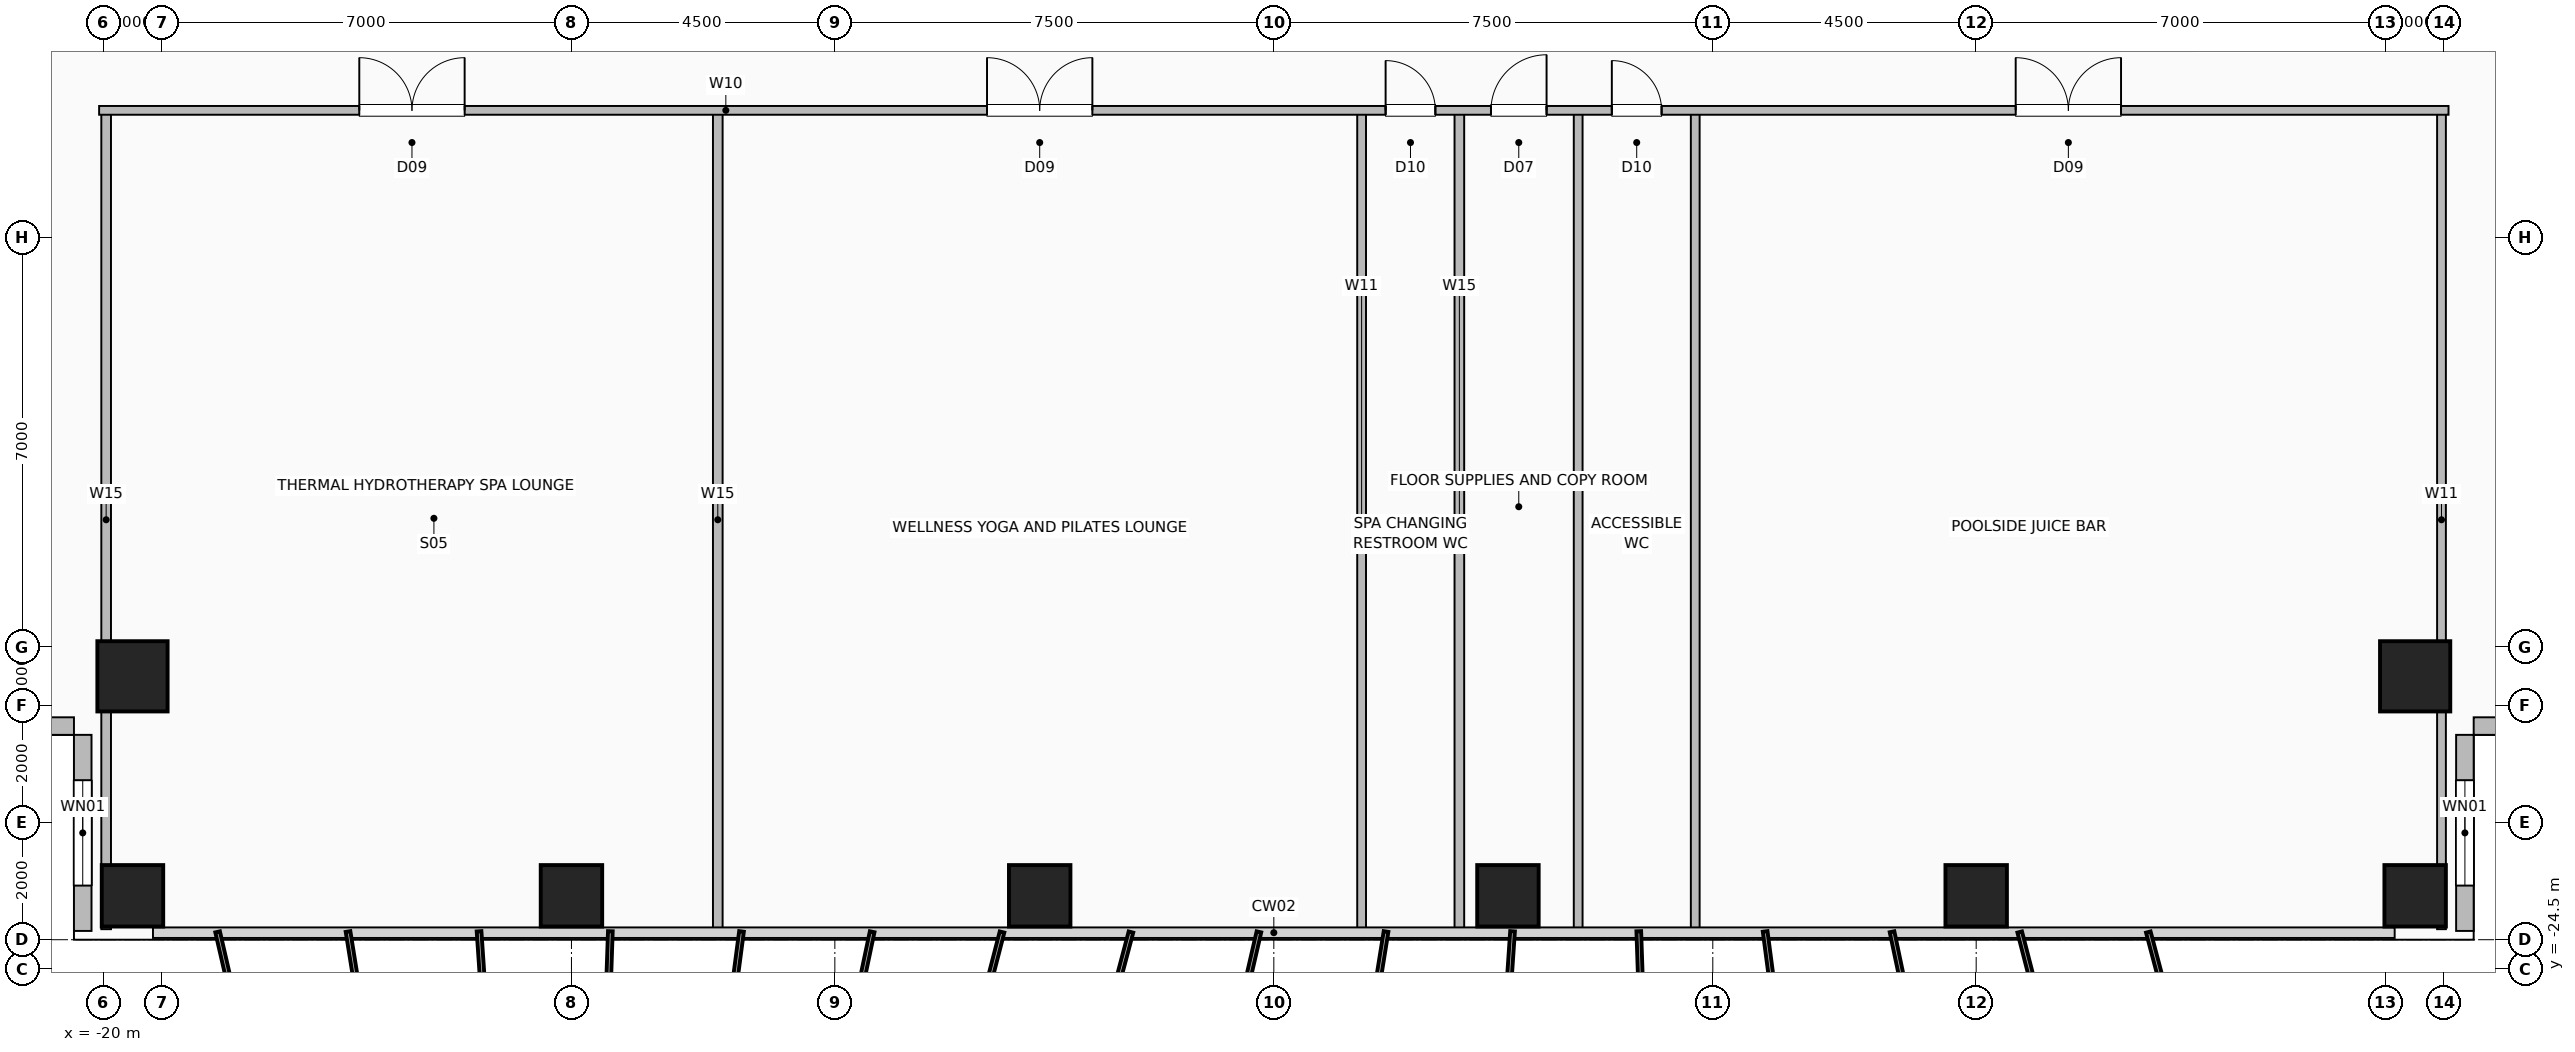
"""IFC4 building model, lengths in metres.
Left out: names, types, materials, properties, quantities, classifications, styles, units other than length and angle.
Written with IfcOpenShell. Run it as: python <this file> out.ifc"""

import sys

from ifc_helpers import new_model, si_unit, direction, frame, frame_2d, origin, origin_2d, place, context, subcontext, project, spatial, rectangle, hollow_rectangle, extrude, element, fill, save


model = new_model("IFC4")
c1 = context("Model", 3, precision=1e-05, world=origin(), true_north=direction((0.0, 1.0)))
c2 = subcontext(c1, "Body", "Model", "MODEL_VIEW")
j1 = project(units=[si_unit("LENGTHUNIT", "METRE"), si_unit("PLANEANGLEUNIT", "RADIAN")], contexts=[c1])
p1 = place(None, origin())
s1 = spatial("IfcSite", under=j1, at=p1, CompositionType="ELEMENT")
p2 = place(p1, origin())
s2 = spatial("IfcBuilding", under=s1, at=p2, CompositionType="ELEMENT")
p3 = place(p2, frame((0.0, 0.0, 48.0)))
s3 = spatial("IfcBuildingStorey", under=s2, at=p3, CompositionType="ELEMENT", Elevation=48.0)
for number, where, z_axis, x_axis in (
    (1, (-19.5, -23.25, 0.0), (0.0, 0.0, 1.0), (1.0, 0.0, 0.0)),
    (2, (-12.0, -23.25, 0.0), (0.0, 0.0, 1.0), (1.0, 0.0, 0.0)),
    (3, (-4.0, -23.25, 0.0), (0.0, 0.0, 1.0), (1.0, 0.0, 0.0)),
    (4, (4.0, -23.25, 0.0), (0.0, 0.0, 1.0), (1.0, 0.0, 0.0)),
    (5, (12.0, -23.25, 0.0), (0.0, 0.0, 1.0), (1.0, 0.0, 0.0)),
    (6, (19.5, -23.25, 0.0), (0.0, 0.0, 1.0), (1.0, 0.0, 0.0)),
):
    element("IfcColumn", number, at=place(p3, frame(where, z_axis=z_axis, x_axis=x_axis)), inside=s3, PredefinedType="COLUMN", context=c2, shape_type="SweptSolid", body=[
        extrude(hollow_rectangle(XDim=1.05, YDim=1.05, WallThickness=0.05, at=origin_2d()), origin(), (0.0, 0.0, 1.0), 3.5),
    ])
for number, where, z_axis, x_axis in (
    (7, (-19.5, -19.5, 0.0), (0.0, 0.0, 1.0), (1.0, 0.0, 0.0)),
    (8, (19.5, -19.5, 0.0), (0.0, 0.0, 1.0), (1.0, 0.0, 0.0)),
):
    element("IfcColumn", number, at=place(p3, frame(where, z_axis=z_axis, x_axis=x_axis)), inside=s3, PredefinedType="COLUMN", context=c2, shape_type="SweptSolid", body=[
        extrude(hollow_rectangle(XDim=1.2, YDim=1.2, WallThickness=0.055, at=origin_2d()), origin(), (0.0, 0.0, 1.0), 3.5),
    ])
p4 = place(p3, frame((-20.35, -23.85, 0.0), z_axis=(0.0, 0.0, 1.0), x_axis=(0.0, 1.0, 0.0)))
e9 = element("IfcWall", 9, at=p4, inside=s3, PredefinedType="SOLIDWALL", context=c2, shape_type="SweptSolid", body=[
    extrude(rectangle(XDim=3.35, YDim=0.3, at=frame_2d((1.675, 0.0))), origin(), (0.0, 0.0, 1.0), 3.25),
])
p5 = place(p4, frame((0.775, 0.0, 0.9)))
e10 = element("IfcOpeningElement", 10, at=p5, cuts=e9, PredefinedType="OPENING", context=c2, shape_type="SweptSolid", body=[
    extrude(rectangle(XDim=1.8, YDim=1.8, at=frame_2d((0.9, 0.9))), frame((0.0, 0.16, 0.0), z_axis=(0.0, -1.0, 0.0), x_axis=(1.0, 0.0, 0.0)), (0.0, 0.0, 1.0), 0.32),
])
p6 = place(p3, frame((-23.85, -20.35, 0.0), z_axis=(0.0, 0.0, 1.0), x_axis=(1.0, 0.0, 0.0)))
e11 = element("IfcWall", 11, at=p6, inside=s3, PredefinedType="SOLIDWALL", context=c2, shape_type="SweptSolid", body=[
    extrude(rectangle(XDim=3.35, YDim=0.3, at=frame_2d((1.675, 0.0))), origin(), (0.0, 0.0, 1.0), 3.25),
])
p7 = place(p3, frame((20.35, -23.85, 0.0), z_axis=(0.0, 0.0, 1.0), x_axis=(0.0, 1.0, 0.0)))
e12 = element("IfcWall", 12, at=p7, inside=s3, PredefinedType="SOLIDWALL", context=c2, shape_type="SweptSolid", body=[
    extrude(rectangle(XDim=3.35, YDim=0.3, at=frame_2d((1.675, 0.0))), origin(), (0.0, 0.0, 1.0), 3.25),
])
p8 = place(p7, frame((0.775, 0.0, 0.9)))
e13 = element("IfcOpeningElement", 13, at=p8, cuts=e12, PredefinedType="OPENING", context=c2, shape_type="SweptSolid", body=[
    extrude(rectangle(XDim=1.8, YDim=1.8, at=frame_2d((0.9, 0.9))), frame((0.0, 0.16, 0.0), z_axis=(0.0, -1.0, 0.0), x_axis=(1.0, 0.0, 0.0)), (0.0, 0.0, 1.0), 0.32),
])
p9 = place(p3, frame((23.85, -20.35, 0.0), z_axis=(0.0, 0.0, 1.0), x_axis=(-1.0, 0.0, 0.0)))
e14 = element("IfcWall", 14, at=p9, inside=s3, PredefinedType="SOLIDWALL", context=c2, shape_type="SweptSolid", body=[
    extrude(rectangle(XDim=3.35, YDim=0.3, at=frame_2d((1.675, 0.0))), origin(), (0.0, 0.0, 1.0), 3.25),
])
for number, where, z_axis, x_axis in (
    (15, (3.17, -23.82, 0.0), (0.0, 0.0, 1.0), (0.0, 1.0, 0.0)),
    (16, (-19.95, -23.82, 0.0), (0.0, 0.0, 1.0), (0.0, 1.0, 0.0)),
    (17, (-9.5, -23.82, 0.0), (0.0, 0.0, 1.0), (0.0, 1.0, 0.0)),
):
    element("IfcWall", number, at=place(p3, frame(where, z_axis=z_axis, x_axis=x_axis)), inside=s3, PredefinedType="PLUMBINGWALL", context=c2, shape_type="SweptSolid", body=[
        extrude(rectangle(XDim=13.99, YDim=0.165, at=frame_2d((6.995, 0.0))), origin(), (0.0, 0.0, 1.0), 3.25),
    ])
for number, where, z_axis, x_axis in (
    (18, (1.5, -23.82, 0.0), (0.0, 0.0, 1.0), (0.0, 1.0, 0.0)),
    (19, (5.2, -23.82, 0.0), (0.0, 0.0, 1.0), (0.0, 1.0, 0.0)),
    (20, (7.2, -23.82, 0.0), (0.0, 0.0, 1.0), (0.0, 1.0, 0.0)),
    (21, (19.95, -23.82, 0.0), (0.0, 0.0, 1.0), (0.0, 1.0, 0.0)),
):
    element("IfcWall", number, at=place(p3, frame(where, z_axis=z_axis, x_axis=x_axis)), inside=s3, PredefinedType="PARTITIONING", context=c2, shape_type="SweptSolid", body=[
        extrude(rectangle(XDim=13.99, YDim=0.15, at=frame_2d((6.995, 0.0))), origin(), (0.0, 0.0, 1.0), 3.25),
    ])
p10 = place(p3, frame((-20.07, -9.83, 0.0), z_axis=(0.0, 0.0, 1.0), x_axis=(1.0, 0.0, 0.0)))
e22 = element("IfcWall", 22, at=p10, inside=s3, PredefinedType="PARTITIONING", context=c2, shape_type="SweptSolid", body=[
    extrude(rectangle(XDim=40.14, YDim=0.15, at=frame_2d((20.07, 0.0))), origin(), (0.0, 0.0, 1.0), 3.25),
])
p11 = place(p10, frame((4.445, 0.0, 0.0)))
e23 = element("IfcOpeningElement", 23, at=p11, cuts=e22, PredefinedType="OPENING", context=c2, shape_type="SweptSolid", body=[
    extrude(rectangle(XDim=1.8, YDim=2.08, at=frame_2d((0.9, 1.04))), frame((0.0, 0.085, 0.0), z_axis=(0.0, -1.0, 0.0), x_axis=(1.0, 0.0, 0.0)), (0.0, 0.0, 1.0), 0.17),
])
p12 = place(p10, frame((15.17, 0.0, 0.0)))
e24 = element("IfcOpeningElement", 24, at=p12, cuts=e22, PredefinedType="OPENING", context=c2, shape_type="SweptSolid", body=[
    extrude(rectangle(XDim=1.8, YDim=2.08, at=frame_2d((0.9, 1.04))), frame((0.0, 0.085, 0.0), z_axis=(0.0, -1.0, 0.0), x_axis=(1.0, 0.0, 0.0)), (0.0, 0.0, 1.0), 0.17),
])
p13 = place(p10, frame((21.98, 0.0, 0.0)))
e25 = element("IfcOpeningElement", 25, at=p13, cuts=e22, PredefinedType="OPENING", context=c2, shape_type="SweptSolid", body=[
    extrude(rectangle(XDim=0.85, YDim=2.05, at=frame_2d((0.425, 1.025))), frame((0.0, 0.085, 0.0), z_axis=(0.0, -1.0, 0.0), x_axis=(1.0, 0.0, 0.0)), (0.0, 0.0, 1.0), 0.17),
])
p14 = place(p10, frame((23.78, 0.0, 0.0)))
e26 = element("IfcOpeningElement", 26, at=p14, cuts=e22, PredefinedType="OPENING", context=c2, shape_type="SweptSolid", body=[
    extrude(rectangle(XDim=0.95, YDim=2.06, at=frame_2d((0.475, 1.03))), frame((0.0, 0.085, 0.0), z_axis=(0.0, -1.0, 0.0), x_axis=(1.0, 0.0, 0.0)), (0.0, 0.0, 1.0), 0.17),
])
p15 = place(p10, frame((25.845, 0.0, 0.0)))
e27 = element("IfcOpeningElement", 27, at=p15, cuts=e22, PredefinedType="OPENING", context=c2, shape_type="SweptSolid", body=[
    extrude(rectangle(XDim=0.85, YDim=2.05, at=frame_2d((0.425, 1.025))), frame((0.0, 0.085, 0.0), z_axis=(0.0, -1.0, 0.0), x_axis=(1.0, 0.0, 0.0)), (0.0, 0.0, 1.0), 0.17),
])
p16 = place(p10, frame((32.745, 0.0, 0.0)))
e28 = element("IfcOpeningElement", 28, at=p16, cuts=e22, PredefinedType="OPENING", context=c2, shape_type="SweptSolid", body=[
    extrude(rectangle(XDim=1.8, YDim=2.08, at=frame_2d((0.9, 1.04))), frame((0.0, 0.085, 0.0), z_axis=(0.0, -1.0, 0.0), x_axis=(1.0, 0.0, 0.0)), (0.0, 0.0, 1.0), 0.17),
])
p17 = place(p5, origin())
e29 = element("IfcWindow", 29, at=p17, inside=s3, PartitioningType="SINGLE_PANEL", PredefinedType="WINDOW", context=c2, shape_type="SweptSolid", body=[
    extrude(rectangle(XDim=1.8, YDim=1.8, at=frame_2d((0.9, 0.9))), frame((0.0, 0.03, 0.0), z_axis=(0.0, -1.0, 0.0), x_axis=(1.0, 0.0, 0.0)), (0.0, 0.0, 1.0), 0.06),
])
fill(e10, e29)
p18 = place(p8, origin())
e30 = element("IfcWindow", 30, at=p18, inside=s3, PartitioningType="SINGLE_PANEL", PredefinedType="WINDOW", context=c2, shape_type="SweptSolid", body=[
    extrude(rectangle(XDim=1.8, YDim=1.8, at=frame_2d((0.9, 0.9))), frame((0.0, 0.03, 0.0), z_axis=(0.0, -1.0, 0.0), x_axis=(1.0, 0.0, 0.0)), (0.0, 0.0, 1.0), 0.06),
])
fill(e13, e30)
p19 = place(p11, origin())
e31 = element("IfcDoor", 31, at=p19, inside=s3, OperationType="DOUBLE_DOOR_SINGLE_SWING", PredefinedType="DOOR", context=c2, shape_type="SweptSolid", body=[
    extrude(rectangle(XDim=1.8, YDim=2.08, at=frame_2d((0.9, 1.04))), frame((0.0, 0.025, 0.0), z_axis=(0.0, -1.0, 0.0), x_axis=(1.0, 0.0, 0.0)), (0.0, 0.0, 1.0), 0.05),
])
fill(e23, e31)
p20 = place(p12, origin())
e32 = element("IfcDoor", 32, at=p20, inside=s3, OperationType="DOUBLE_DOOR_SINGLE_SWING", PredefinedType="DOOR", context=c2, shape_type="SweptSolid", body=[
    extrude(rectangle(XDim=1.8, YDim=2.08, at=frame_2d((0.9, 1.04))), frame((0.0, 0.025, 0.0), z_axis=(0.0, -1.0, 0.0), x_axis=(1.0, 0.0, 0.0)), (0.0, 0.0, 1.0), 0.05),
])
fill(e24, e32)
p21 = place(p13, origin())
e33 = element("IfcDoor", 33, at=p21, inside=s3, OperationType="SINGLE_SWING_LEFT", PredefinedType="DOOR", context=c2, shape_type="SweptSolid", body=[
    extrude(rectangle(XDim=0.85, YDim=2.05, at=frame_2d((0.425, 1.025))), frame((0.0, 0.025, 0.0), z_axis=(0.0, -1.0, 0.0), x_axis=(1.0, 0.0, 0.0)), (0.0, 0.0, 1.0), 0.05),
])
fill(e25, e33)
p22 = place(p14, origin())
e34 = element("IfcDoor", 34, at=p22, inside=s3, OperationType="SINGLE_SWING_RIGHT", PredefinedType="DOOR", context=c2, shape_type="SweptSolid", body=[
    extrude(rectangle(XDim=0.95, YDim=2.06, at=frame_2d((0.475, 1.03))), frame((0.0, 0.025, 0.0), z_axis=(0.0, -1.0, 0.0), x_axis=(1.0, 0.0, 0.0)), (0.0, 0.0, 1.0), 0.05),
])
fill(e26, e34)
p23 = place(p15, origin())
e35 = element("IfcDoor", 35, at=p23, inside=s3, OperationType="SINGLE_SWING_LEFT", PredefinedType="DOOR", context=c2, shape_type="SweptSolid", body=[
    extrude(rectangle(XDim=0.85, YDim=2.05, at=frame_2d((0.425, 1.025))), frame((0.0, 0.025, 0.0), z_axis=(0.0, -1.0, 0.0), x_axis=(1.0, 0.0, 0.0)), (0.0, 0.0, 1.0), 0.05),
])
fill(e27, e35)
p24 = place(p16, origin())
e36 = element("IfcDoor", 36, at=p24, inside=s3, OperationType="DOUBLE_DOOR_SINGLE_SWING", PredefinedType="DOOR", context=c2, shape_type="SweptSolid", body=[
    extrude(rectangle(XDim=1.8, YDim=2.08, at=frame_2d((0.9, 1.04))), frame((0.0, 0.025, 0.0), z_axis=(0.0, -1.0, 0.0), x_axis=(1.0, 0.0, 0.0)), (0.0, 0.0, 1.0), 0.05),
])
fill(e28, e36)
save(model, sys.argv[1])
